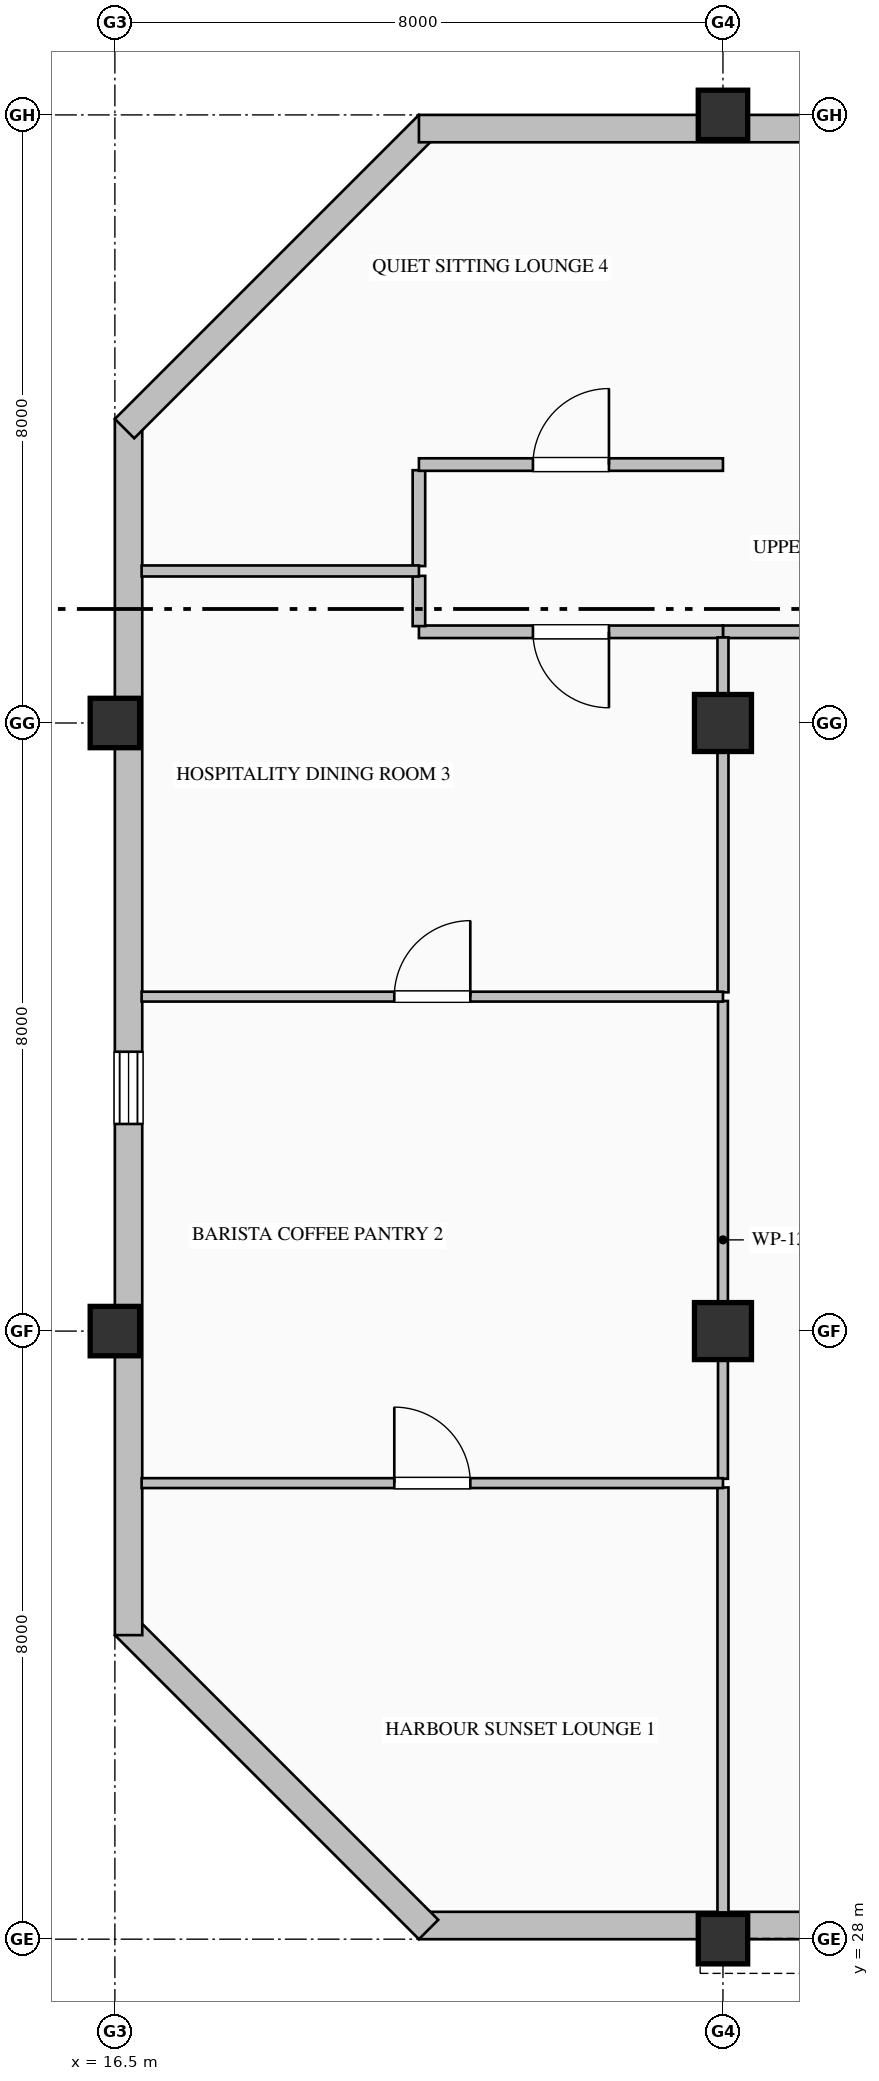
"""IFC4 building model, lengths in metres.
Left out: names, types, materials, properties, quantities, classifications, styles, units other than length and angle.
Written with IfcOpenShell. Run it as: python <this file> out.ifc"""

import sys

from ifc_helpers import new_model, si_unit, direction, frame, frame_2d, origin, origin_2d, place, context, subcontext, project, spatial, rectangle, hollow_rectangle, extrude, element, fill, save


model = new_model("IFC4")
c1 = context("Model", 3, precision=1e-05, world=origin(), true_north=direction((0.0, 1.0)))
c2 = subcontext(c1, "Body", "Model", "MODEL_VIEW")
j1 = project(units=[si_unit("LENGTHUNIT", "METRE"), si_unit("PLANEANGLEUNIT", "RADIAN")], contexts=[c1])
p1 = place(None, origin())
s1 = spatial("IfcSite", under=j1, at=p1, CompositionType="ELEMENT")
p2 = place(p1, origin())
s2 = spatial("IfcBuilding", under=s1, at=p2, CompositionType="ELEMENT")
p3 = place(p2, frame((0.0, 0.0, 331.2)))
s3 = spatial("IfcBuildingStorey", under=s2, at=p3, CompositionType="ELEMENT", Elevation=331.2)
for number, where, z_axis, x_axis in (
    (1, (16.5, 36.0, 0.0), (0.0, 0.0, 1.0), (1.0, 0.0, 0.0)),
    (2, (16.5, 44.0, 0.0), (0.0, 0.0, 1.0), (1.0, 0.0, 0.0)),
    (3, (24.5, 28.0, 0.0), (0.0, 0.0, 1.0), (1.0, 0.0, 0.0)),
):
    element("IfcColumn", number, at=place(p3, frame(where, z_axis=z_axis, x_axis=x_axis)), inside=s3, PredefinedType="COLUMN", context=c2, shape_type="SweptSolid", body=[
        extrude(hollow_rectangle(XDim=0.65, YDim=0.65, WallThickness=0.028, at=origin_2d()), origin(), (0.0, 0.0, 1.0), 4.0),
    ])
for number, where, z_axis, x_axis in (
    (4, (24.5, 36.0, 0.0), (0.0, 0.0, 1.0), (1.0, 0.0, 0.0)),
    (5, (24.5, 44.0, 0.0), (0.0, 0.0, 1.0), (1.0, 0.0, 0.0)),
):
    element("IfcColumn", number, at=place(p3, frame(where, z_axis=z_axis, x_axis=x_axis)), inside=s3, PredefinedType="COLUMN", context=c2, shape_type="SweptSolid", body=[
        extrude(rectangle(XDim=0.75, YDim=0.75, at=origin_2d()), origin(), (0.0, 0.0, 1.0), 4.0),
    ])
p4 = place(p3, frame((24.5, 52.0, 0.0), z_axis=(0.0, 0.0, 1.0), x_axis=(1.0, 0.0, 0.0)))
e6 = element("IfcColumn", 6, at=p4, inside=s3, PredefinedType="COLUMN", context=c2, shape_type="SweptSolid", body=[
    extrude(hollow_rectangle(XDim=0.65, YDim=0.65, WallThickness=0.028, at=origin_2d()), origin(), (0.0, 0.0, 1.0), 4.0),
])
p5 = place(p3, frame((40.52, 28.18, 0.0), z_axis=(0.0, 0.0, 1.0), x_axis=(-1.0, 0.0, 0.0)))
e7 = element("IfcWall", 7, at=p5, inside=s3, PredefinedType="SOLIDWALL", context=c2, shape_type="SweptSolid", body=[
    extrude(rectangle(XDim=20.02, YDim=0.36, at=frame_2d((10.01, 0.0))), origin(), (0.0, 0.0, 1.0), 3.185),
])
p6 = place(p5, frame((3.125, 0.0, 0.9)))
e8 = element("IfcOpeningElement", 8, at=p6, cuts=e7, PredefinedType="OPENING", context=c2, shape_type="SweptSolid", body=[
    extrude(rectangle(XDim=0.95, YDim=1.85, at=frame_2d((0.475, 0.925))), frame((0.0, 0.19, 0.0), z_axis=(0.0, -1.0, 0.0), x_axis=(1.0, 0.0, 0.0)), (0.0, 0.0, 1.0), 0.38),
])
p7 = place(p5, frame((10.125, 0.0, 0.9)))
e9 = element("IfcOpeningElement", 9, at=p7, cuts=e7, PredefinedType="OPENING", context=c2, shape_type="SweptSolid", body=[
    extrude(rectangle(XDim=1.35, YDim=1.85, at=frame_2d((0.675, 0.925))), frame((0.0, 0.19, 0.0), z_axis=(0.0, -1.0, 0.0), x_axis=(1.0, 0.0, 0.0)), (0.0, 0.0, 1.0), 0.38),
])
p8 = place(p5, frame((13.925, 0.0, 0.9)))
e10 = element("IfcOpeningElement", 10, at=p8, cuts=e7, PredefinedType="OPENING", context=c2, shape_type="SweptSolid", body=[
    extrude(rectangle(XDim=0.95, YDim=1.85, at=frame_2d((0.475, 0.925))), frame((0.0, 0.19, 0.0), z_axis=(0.0, -1.0, 0.0), x_axis=(1.0, 0.0, 0.0)), (0.0, 0.0, 1.0), 0.38),
])
p9 = place(p3, frame((20.627, 28.127, 0.0), z_axis=(0.0, 0.0, 1.0), x_axis=(-0.707106781187, 0.707106781187, 0.0)))
e11 = element("IfcWall", 11, at=p9, inside=s3, PredefinedType="SOLIDWALL", context=c2, shape_type="SweptSolid", body=[
    extrude(rectangle(XDim=5.657, YDim=0.36, at=frame_2d((2.828, 0.0))), origin(), (0.0, 0.0, 1.0), 3.785),
])
p10 = place(p3, frame((16.68, 32.0, 0.0), z_axis=(0.0, 0.0, 1.0), x_axis=(0.0, 1.0, 0.0)))
e12 = element("IfcWall", 12, at=p10, inside=s3, PredefinedType="SOLIDWALL", context=c2, shape_type="SweptSolid", body=[
    extrude(rectangle(XDim=16.0, YDim=0.36, at=frame_2d((8.0, 0.0))), origin(), (0.0, 0.0, 1.0), 3.335),
])
p11 = place(p10, frame((6.725, 0.0, 0.9)))
e13 = element("IfcOpeningElement", 13, at=p11, cuts=e12, PredefinedType="OPENING", context=c2, shape_type="SweptSolid", body=[
    extrude(rectangle(XDim=0.95, YDim=1.85, at=frame_2d((0.475, 0.925))), frame((0.0, 0.19, 0.0), z_axis=(0.0, -1.0, 0.0), x_axis=(1.0, 0.0, 0.0)), (0.0, 0.0, 1.0), 0.38),
])
p12 = place(p3, frame((16.627, 47.873, 0.0), z_axis=(0.0, 0.0, 1.0), x_axis=(0.707106781187, 0.707106781187, 0.0)))
e14 = element("IfcWall", 14, at=p12, inside=s3, PredefinedType="SOLIDWALL", context=c2, shape_type="SweptSolid", body=[
    extrude(rectangle(XDim=5.657, YDim=0.36, at=frame_2d((2.828, 0.0))), origin(), (0.0, 0.0, 1.0), 3.785),
])
p13 = place(p3, frame((20.5, 51.82, 0.0), z_axis=(0.0, 0.0, 1.0), x_axis=(1.0, 0.0, 0.0)))
e15 = element("IfcWall", 15, at=p13, inside=s3, PredefinedType="SOLIDWALL", context=c2, shape_type="SweptSolid", body=[
    extrude(rectangle(XDim=20.02, YDim=0.36, at=frame_2d((10.01, 0.0))), origin(), (0.0, 0.0, 1.0), 3.335),
])
p14 = place(p13, frame((6.525, 0.0, 0.9)))
e16 = element("IfcOpeningElement", 16, at=p14, cuts=e15, PredefinedType="OPENING", context=c2, shape_type="SweptSolid", body=[
    extrude(rectangle(XDim=1.35, YDim=1.85, at=frame_2d((0.675, 0.925))), frame((0.0, 0.19, 0.0), z_axis=(0.0, -1.0, 0.0), x_axis=(1.0, 0.0, 0.0)), (0.0, 0.0, 1.0), 0.38),
])
p15 = place(p13, frame((10.325, 0.0, 0.9)))
e17 = element("IfcOpeningElement", 17, at=p15, cuts=e15, PredefinedType="OPENING", context=c2, shape_type="SweptSolid", body=[
    extrude(rectangle(XDim=0.95, YDim=1.85, at=frame_2d((0.475, 0.925))), frame((0.0, 0.19, 0.0), z_axis=(0.0, -1.0, 0.0), x_axis=(1.0, 0.0, 0.0)), (0.0, 0.0, 1.0), 0.38),
])
p16 = place(p3, frame((37.8, 45.2, 0.0), z_axis=(0.0, 0.0, 1.0), x_axis=(-1.0, 0.0, 0.0)))
e18 = element("IfcWall", 18, at=p16, inside=s3, PredefinedType="PARTITIONING", context=c2, shape_type="SweptSolid", body=[
    extrude(rectangle(XDim=13.3, YDim=0.165, at=frame_2d((6.65, 0.0))), origin(), (0.0, 0.0, 1.0), 3.785),
])
p17 = place(p16, frame((6.15, 0.0, 0.0)))
e19 = element("IfcOpeningElement", 19, at=p17, cuts=e18, PredefinedType="OPENING", context=c2, shape_type="SweptSolid", body=[
    extrude(rectangle(XDim=1.0, YDim=2.15, at=frame_2d((0.5, 1.075))), frame((0.0, 0.093, 0.0), z_axis=(0.0, -1.0, 0.0), x_axis=(1.0, 0.0, 0.0)), (0.0, 0.0, 1.0), 0.185),
])
p18 = place(p3, frame((24.5, 45.2, 0.0), z_axis=(0.0, 0.0, 1.0), x_axis=(-1.0, 0.0, 0.0)))
e20 = element("IfcWall", 20, at=p18, inside=s3, PredefinedType="PARTITIONING", context=c2, shape_type="SweptSolid", body=[
    extrude(rectangle(XDim=4.0, YDim=0.165, at=frame_2d((2.0, 0.0))), origin(), (0.0, 0.0, 1.0), 3.785),
])
p19 = place(p18, frame((1.5, 0.0, 0.0)))
e21 = element("IfcOpeningElement", 21, at=p19, cuts=e20, PredefinedType="OPENING", context=c2, shape_type="SweptSolid", body=[
    extrude(rectangle(XDim=1.0, YDim=2.15, at=frame_2d((0.5, 1.075))), frame((0.0, 0.093, 0.0), z_axis=(0.0, -1.0, 0.0), x_axis=(1.0, 0.0, 0.0)), (0.0, 0.0, 1.0), 0.185),
])
p20 = place(p3, frame((20.5, 45.274, 0.0), z_axis=(0.0, 0.0, 1.0), x_axis=(0.0, 1.0, 0.0)))
e22 = element("IfcWall", 22, at=p20, inside=s3, PredefinedType="PARTITIONING", context=c2, shape_type="SweptSolid", body=[
    extrude(rectangle(XDim=0.661, YDim=0.165, at=frame_2d((0.331, 0.0))), origin(), (0.0, 0.0, 1.0), 3.785),
])
p21 = place(p3, frame((20.5, 46.064, 0.0), z_axis=(0.0, 0.0, 1.0), x_axis=(0.0, 1.0, 0.0)))
e23 = element("IfcWall", 23, at=p21, inside=s3, PredefinedType="PARTITIONING", context=c2, shape_type="SweptSolid", body=[
    extrude(rectangle(XDim=1.261, YDim=0.165, at=frame_2d((0.63, 0.0))), origin(), (0.0, 0.0, 1.0), 3.785),
])
p22 = place(p3, frame((20.5, 47.4, 0.0), z_axis=(0.0, 0.0, 1.0), x_axis=(1.0, 0.0, 0.0)))
e24 = element("IfcWall", 24, at=p22, inside=s3, PredefinedType="PARTITIONING", context=c2, shape_type="SweptSolid", body=[
    extrude(rectangle(XDim=4.0, YDim=0.165, at=frame_2d((2.0, 0.0))), origin(), (0.0, 0.0, 1.0), 3.785),
])
p23 = place(p22, frame((1.5, 0.0, 0.0)))
e25 = element("IfcOpeningElement", 25, at=p23, cuts=e24, PredefinedType="OPENING", context=c2, shape_type="SweptSolid", body=[
    extrude(rectangle(XDim=1.0, YDim=2.15, at=frame_2d((0.5, 1.075))), frame((0.0, 0.093, 0.0), z_axis=(0.0, -1.0, 0.0), x_axis=(1.0, 0.0, 0.0)), (0.0, 0.0, 1.0), 0.185),
])
p24 = place(p3, frame((24.5, 28.352, 0.0), z_axis=(0.0, 0.0, 1.0), x_axis=(0.0, 1.0, 0.0)))
e26 = element("IfcWall", 26, at=p24, inside=s3, PredefinedType="PARTITIONING", context=c2, shape_type="SweptSolid", body=[
    extrude(rectangle(XDim=5.591, YDim=0.145, at=frame_2d((2.795, 0.0))), origin(), (0.0, 0.0, 1.0), 3.177),
])
p25 = place(p3, frame((24.5, 34.057, 0.0), z_axis=(0.0, 0.0, 1.0), x_axis=(0.0, 1.0, 0.0)))
e27 = element("IfcWall", 27, at=p25, inside=s3, PredefinedType="PARTITIONING", context=c2, shape_type="SweptSolid", body=[
    extrude(rectangle(XDim=6.286, YDim=0.13, at=frame_2d((3.143, 0.0))), origin(), (0.0, 0.0, 1.0), 3.177),
])
p26 = place(p3, frame((24.5, 40.457, 0.0), z_axis=(0.0, 0.0, 1.0), x_axis=(0.0, 1.0, 0.0)))
e28 = element("IfcWall", 28, at=p26, inside=s3, PredefinedType="PARTITIONING", context=c2, shape_type="SweptSolid", body=[
    extrude(rectangle(XDim=4.668, YDim=0.145, at=frame_2d((2.334, 0.0))), origin(), (0.0, 0.0, 1.0), 3.177),
])
p27 = place(p3, frame((16.852, 34.0, 0.0), z_axis=(0.0, 0.0, 1.0), x_axis=(1.0, 0.0, 0.0)))
e29 = element("IfcWall", 29, at=p27, inside=s3, PredefinedType="PARTITIONING", context=c2, shape_type="SweptSolid", body=[
    extrude(rectangle(XDim=7.648, YDim=0.13, at=frame_2d((3.824, 0.0))), origin(), (0.0, 0.0, 1.0), 3.785),
])
p28 = place(p27, frame((3.324, 0.0, 0.0)))
e30 = element("IfcOpeningElement", 30, at=p28, cuts=e29, PredefinedType="OPENING", context=c2, shape_type="SweptSolid", body=[
    extrude(rectangle(XDim=1.0, YDim=2.15, at=frame_2d((0.5, 1.075))), frame((0.0, 0.075, 0.0), z_axis=(0.0, -1.0, 0.0), x_axis=(1.0, 0.0, 0.0)), (0.0, 0.0, 1.0), 0.15),
])
p29 = place(p3, frame((16.852, 40.4, 0.0), z_axis=(0.0, 0.0, 1.0), x_axis=(1.0, 0.0, 0.0)))
e31 = element("IfcWall", 31, at=p29, inside=s3, PredefinedType="PARTITIONING", context=c2, shape_type="SweptSolid", body=[
    extrude(rectangle(XDim=7.648, YDim=0.13, at=frame_2d((3.824, 0.0))), origin(), (0.0, 0.0, 1.0), 3.785),
])
p30 = place(p29, frame((3.324, 0.0, 0.0)))
e32 = element("IfcOpeningElement", 32, at=p30, cuts=e31, PredefinedType="OPENING", context=c2, shape_type="SweptSolid", body=[
    extrude(rectangle(XDim=1.0, YDim=2.15, at=frame_2d((0.5, 1.075))), frame((0.0, 0.075, 0.0), z_axis=(0.0, -1.0, 0.0), x_axis=(1.0, 0.0, 0.0)), (0.0, 0.0, 1.0), 0.15),
])
p31 = place(p3, frame((16.852, 46.0, 0.0), z_axis=(0.0, 0.0, 1.0), x_axis=(1.0, 0.0, 0.0)))
e33 = element("IfcWall", 33, at=p31, inside=s3, PredefinedType="PARTITIONING", context=c2, shape_type="SweptSolid", body=[
    extrude(rectangle(XDim=3.648, YDim=0.145, at=frame_2d((1.824, 0.0))), origin(), (0.0, 0.0, 1.0), 3.785),
])
p32 = place(p11, origin())
e34 = element("IfcWindow", 34, at=p32, inside=s3, PartitioningType="SINGLE_PANEL", PredefinedType="WINDOW", context=c2, shape_type="SweptSolid", body=[
    extrude(rectangle(XDim=0.95, YDim=1.85, at=frame_2d((0.475, 0.925))), frame((0.0, 0.15, 0.0), z_axis=(0.0, -1.0, 0.0), x_axis=(1.0, 0.0, 0.0)), (0.0, 0.0, 1.0), 0.06),
])
fill(e13, e34)
p33 = place(p28, origin())
e35 = element("IfcDoor", 35, at=p33, inside=s3, OperationType="SINGLE_SWING_LEFT", PredefinedType="DOOR", context=c2, shape_type="SweptSolid", body=[
    extrude(rectangle(XDim=1.0, YDim=2.15, at=frame_2d((0.5, 1.075))), frame((0.0, 0.025, 0.0), z_axis=(0.0, -1.0, 0.0), x_axis=(1.0, 0.0, 0.0)), (0.0, 0.0, 1.0), 0.05),
])
fill(e30, e35)
p34 = place(p30, origin())
e36 = element("IfcDoor", 36, at=p34, inside=s3, OperationType="SINGLE_SWING_RIGHT", PredefinedType="DOOR", context=c2, shape_type="SweptSolid", body=[
    extrude(rectangle(XDim=1.0, YDim=2.15, at=frame_2d((0.5, 1.075))), frame((0.0, 0.025, 0.0), z_axis=(0.0, -1.0, 0.0), x_axis=(1.0, 0.0, 0.0)), (0.0, 0.0, 1.0), 0.05),
])
fill(e32, e36)
p35 = place(p19, origin())
e37 = element("IfcDoor", 37, at=p35, inside=s3, OperationType="SINGLE_SWING_LEFT", PredefinedType="DOOR", context=c2, shape_type="SweptSolid", body=[
    extrude(rectangle(XDim=1.0, YDim=2.15, at=frame_2d((0.5, 1.075))), frame((0.0, 0.025, 0.0), z_axis=(0.0, -1.0, 0.0), x_axis=(1.0, 0.0, 0.0)), (0.0, 0.0, 1.0), 0.05),
])
fill(e21, e37)
p36 = place(p23, origin())
e38 = element("IfcDoor", 38, at=p36, inside=s3, OperationType="SINGLE_SWING_RIGHT", PredefinedType="DOOR", context=c2, shape_type="SweptSolid", body=[
    extrude(rectangle(XDim=1.0, YDim=2.15, at=frame_2d((0.5, 1.075))), frame((0.0, 0.025, 0.0), z_axis=(0.0, -1.0, 0.0), x_axis=(1.0, 0.0, 0.0)), (0.0, 0.0, 1.0), 0.05),
])
fill(e25, e38)
save(model, sys.argv[1])
